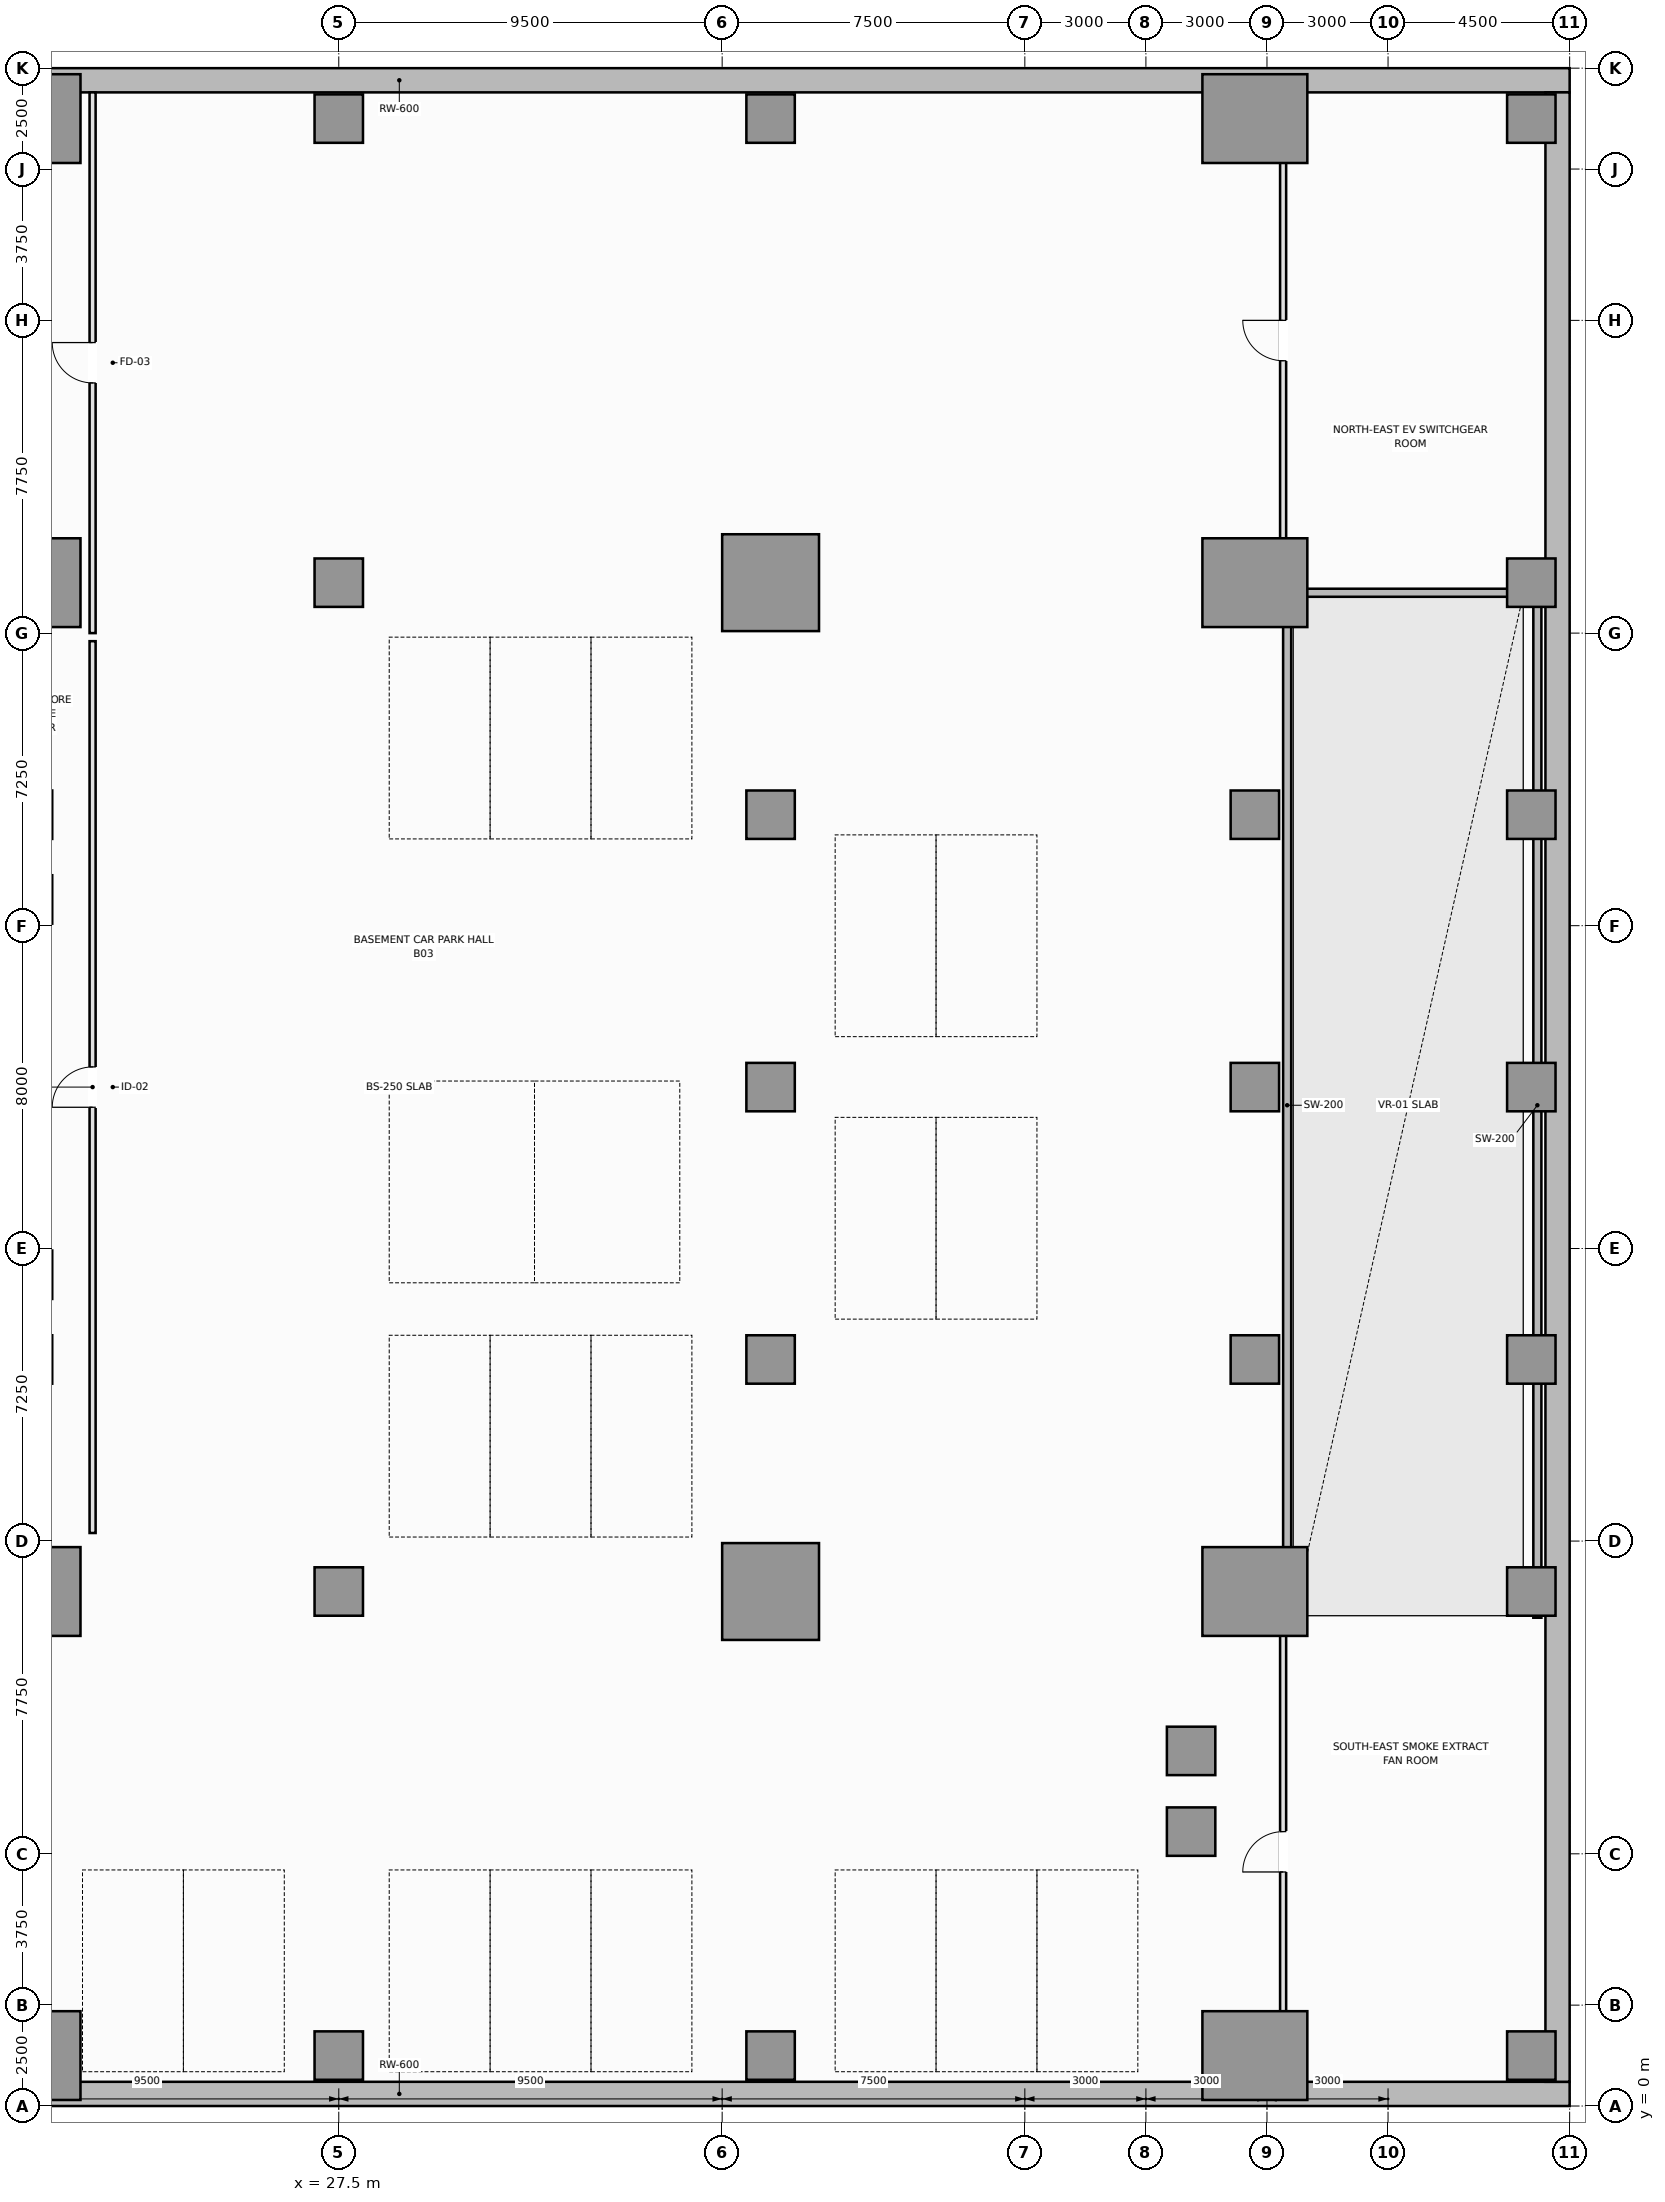
"""IFC4 building model, lengths in metres.
Left out: names, types, materials, properties, quantities, classifications, styles, units other than length and angle.
Written with IfcOpenShell. Run it as: python <this file> out.ifc"""

import sys

from ifc_helpers import new_model, si_unit, direction, frame, frame_2d, origin, origin_2d, place, context, subcontext, project, spatial, rectangle, extrude, element, fill, save


model = new_model("IFC4")
c1 = context("Model", 3, precision=1e-05, world=origin(), true_north=direction((0.0, 1.0)))
c2 = subcontext(c1, "Body", "Model", "MODEL_VIEW")
j1 = project(units=[si_unit("LENGTHUNIT", "METRE"), si_unit("PLANEANGLEUNIT", "RADIAN")], contexts=[c1])
p1 = place(None, origin())
s1 = spatial("IfcSite", under=j1, at=p1, CompositionType="ELEMENT")
p2 = place(p1, origin())
s2 = spatial("IfcBuilding", under=s1, at=p2, CompositionType="ELEMENT")
p3 = place(p2, frame((0.0, 0.0, -13.2)))
s3 = spatial("IfcBuildingStorey", under=s2, at=p3, CompositionType="ELEMENT", Elevation=-13.2)
for number, where, z_axis, x_axis in (
    (1, (0.0, 0.3, 0.0), (0.0, 0.0, 1.0), (1.0, 0.0, 0.0)),
    (2, (0.0, 50.2, 0.0), (0.0, 0.0, 1.0), (1.0, 0.0, 0.0)),
):
    element("IfcWall", number, at=place(p3, frame(where, z_axis=z_axis, x_axis=x_axis)), inside=s3, PredefinedType="USERDEFINED", context=c2, shape_type="SweptSolid", body=[
        extrude(rectangle(XDim=58.0, YDim=0.6, at=frame_2d((29.0, 0.0))), origin(), (0.0, 0.0, 1.0), 4.2),
    ])
p4 = place(p3, frame((57.7, 0.6, 0.0), z_axis=(0.0, 0.0, 1.0), x_axis=(0.0, 1.0, 0.0)))
e3 = element("IfcWall", 3, at=p4, inside=s3, PredefinedType="USERDEFINED", context=c2, shape_type="SweptSolid", body=[
    extrude(rectangle(XDim=49.3, YDim=0.6, at=frame_2d((24.65, 0.0))), origin(), (0.0, 0.0, 1.0), 4.2),
])
for number, where, z_axis, x_axis in (
    (4, (38.2, 12.75, 0.0), (0.0, 0.0, 1.0), (1.0, 0.0, 0.0)),
    (5, (38.2, 37.75, 0.0), (0.0, 0.0, 1.0), (1.0, 0.0, 0.0)),
):
    element("IfcColumn", number, at=place(p3, frame(where, z_axis=z_axis, x_axis=x_axis)), inside=s3, PredefinedType="COLUMN", context=c2, shape_type="SweptSolid", body=[
        extrude(rectangle(XDim=2.4, YDim=2.4, at=origin_2d()), origin(), (0.0, 0.0, 1.0), 4.2),
    ])
for number, where, z_axis, x_axis in (
    (6, (27.5, 12.75, 0.0), (0.0, 0.0, 1.0), (1.0, 0.0, 0.0)),
    (7, (27.5, 37.75, 0.0), (0.0, 0.0, 1.0), (1.0, 0.0, 0.0)),
    (8, (38.2, 18.5, 0.0), (0.0, 0.0, 1.0), (1.0, 0.0, 0.0)),
    (9, (38.2, 25.25, 0.0), (0.0, 0.0, 1.0), (1.0, 0.0, 0.0)),
    (10, (38.2, 32.0, 0.0), (0.0, 0.0, 1.0), (1.0, 0.0, 0.0)),
):
    element("IfcColumn", number, at=place(p3, frame(where, z_axis=z_axis, x_axis=x_axis)), inside=s3, PredefinedType="COLUMN", context=c2, shape_type="SweptSolid", body=[
        extrude(rectangle(XDim=1.2, YDim=1.2, at=origin_2d()), origin(), (0.0, 0.0, 1.0), 4.2),
    ])
for number, where, z_axis, x_axis in (
    (11, (19.8, 1.25, 0.0), (0.0, 0.0, 1.0), (1.0, 0.0, 0.0)),
    (12, (50.2, 1.25, 0.0), (0.0, 0.0, 1.0), (1.0, 0.0, 0.0)),
    (13, (19.8, 12.75, 0.0), (0.0, 0.0, 1.0), (1.0, 0.0, 0.0)),
    (14, (50.2, 12.75, 0.0), (0.0, 0.0, 1.0), (1.0, 0.0, 0.0)),
    (15, (19.8, 37.75, 0.0), (0.0, 0.0, 1.0), (1.0, 0.0, 0.0)),
    (16, (50.2, 37.75, 0.0), (0.0, 0.0, 1.0), (1.0, 0.0, 0.0)),
    (17, (19.8, 49.25, 0.0), (0.0, 0.0, 1.0), (1.0, 0.0, 0.0)),
    (18, (50.2, 49.25, 0.0), (0.0, 0.0, 1.0), (1.0, 0.0, 0.0)),
):
    element("IfcColumn", number, at=place(p3, frame(where, z_axis=z_axis, x_axis=x_axis)), inside=s3, PredefinedType="COLUMN", context=c2, shape_type="SweptSolid", body=[
        extrude(rectangle(XDim=2.6, YDim=2.2, at=origin_2d()), origin(), (0.0, 0.0, 1.0), 4.2),
    ])
for number, where, z_axis, x_axis in (
    (19, (19.8, 18.5, 0.0), (0.0, 0.0, 1.0), (1.0, 0.0, 0.0)),
    (20, (19.8, 20.6, 0.0), (0.0, 0.0, 1.0), (1.0, 0.0, 0.0)),
    (21, (19.8, 29.9, 0.0), (0.0, 0.0, 1.0), (1.0, 0.0, 0.0)),
    (22, (19.8, 32.0, 0.0), (0.0, 0.0, 1.0), (1.0, 0.0, 0.0)),
    (23, (50.2, 18.5, 0.0), (0.0, 0.0, 1.0), (1.0, 0.0, 0.0)),
    (24, (50.2, 25.25, 0.0), (0.0, 0.0, 1.0), (1.0, 0.0, 0.0)),
    (25, (50.2, 32.0, 0.0), (0.0, 0.0, 1.0), (1.0, 0.0, 0.0)),
    (26, (57.05, 1.25, 0.0), (0.0, 0.0, 1.0), (1.0, 0.0, 0.0)),
    (27, (57.05, 12.75, 0.0), (0.0, 0.0, 1.0), (1.0, 0.0, 0.0)),
    (28, (57.05, 18.5, 0.0), (0.0, 0.0, 1.0), (1.0, 0.0, 0.0)),
    (29, (57.05, 25.25, 0.0), (0.0, 0.0, 1.0), (1.0, 0.0, 0.0)),
    (30, (57.05, 32.0, 0.0), (0.0, 0.0, 1.0), (1.0, 0.0, 0.0)),
    (31, (57.05, 37.75, 0.0), (0.0, 0.0, 1.0), (1.0, 0.0, 0.0)),
    (32, (57.05, 49.25, 0.0), (0.0, 0.0, 1.0), (1.0, 0.0, 0.0)),
    (33, (48.62, 6.8, 0.0), (0.0, 0.0, 1.0), (1.0, 0.0, 0.0)),
    (34, (48.62, 8.8, 0.0), (0.0, 0.0, 1.0), (1.0, 0.0, 0.0)),
    (35, (27.5, 1.25, 0.0), (0.0, 0.0, 1.0), (1.0, 0.0, 0.0)),
    (36, (38.2, 1.25, 0.0), (0.0, 0.0, 1.0), (1.0, 0.0, 0.0)),
    (37, (27.5, 49.25, 0.0), (0.0, 0.0, 1.0), (1.0, 0.0, 0.0)),
    (38, (38.2, 49.25, 0.0), (0.0, 0.0, 1.0), (1.0, 0.0, 0.0)),
):
    element("IfcColumn", number, at=place(p3, frame(where, z_axis=z_axis, x_axis=x_axis)), inside=s3, PredefinedType="COLUMN", context=c2, shape_type="SweptSolid", body=[
        extrude(rectangle(XDim=1.2, YDim=1.2, at=origin_2d()), origin(), (0.0, 0.0, 1.0), 4.2),
    ])
for number, where, z_axis, x_axis in (
    (39, (51.0, 12.1, 0.0), (0.0, 0.0, 1.0), (0.0, 1.0, 0.0)),
    (40, (57.2, 12.1, 0.0), (0.0, 0.0, 1.0), (0.0, 1.0, 0.0)),
):
    element("IfcWall", number, at=place(p3, frame(where, z_axis=z_axis, x_axis=x_axis)), inside=s3, PredefinedType="SOLIDWALL", context=c2, shape_type="SweptSolid", body=[
        extrude(rectangle(XDim=25.4, YDim=0.2, at=frame_2d((12.7, 0.0))), origin(), (0.0, 0.0, 1.0), 4.2),
    ])
p5 = place(p3, frame((51.0, 37.5, 0.0), z_axis=(0.0, 0.0, 1.0), x_axis=(1.0, 0.0, 0.0)))
e41 = element("IfcWall", 41, at=p5, inside=s3, PredefinedType="SOLIDWALL", context=c2, shape_type="SweptSolid", body=[
    extrude(rectangle(XDim=6.2, YDim=0.2, at=frame_2d((3.1, 0.0))), origin(), (0.0, 0.0, 1.0), 4.2),
])
p6 = place(p3, frame((21.4, 14.2, 0.0), z_axis=(0.0, 0.0, 1.0), x_axis=(0.0, 1.0, 0.0)))
e42 = element("IfcWall", 42, at=p6, inside=s3, PredefinedType="PARTITIONING", context=c2, shape_type="SweptSolid", body=[
    extrude(rectangle(XDim=22.1, YDim=0.15, at=frame_2d((11.05, 0.0))), origin(), (0.0, 0.0, 1.0), 4.0),
])
p7 = place(p6, frame((10.55, 0.0, 0.0)))
e43 = element("IfcOpeningElement", 43, at=p7, cuts=e42, PredefinedType="OPENING", context=c2, shape_type="SweptSolid", body=[
    extrude(rectangle(XDim=1.0, YDim=2.15, at=frame_2d((0.5, 1.075))), frame((0.0, 0.085, 0.0), z_axis=(0.0, -1.0, 0.0), x_axis=(1.0, 0.0, 0.0)), (0.0, 0.0, 1.0), 0.17),
])
p8 = place(p3, frame((21.4, 36.5, 0.0), z_axis=(0.0, 0.0, 1.0), x_axis=(0.0, 1.0, 0.0)))
e44 = element("IfcWall", 44, at=p8, inside=s3, PredefinedType="PARTITIONING", context=c2, shape_type="SweptSolid", body=[
    extrude(rectangle(XDim=13.4, YDim=0.15, at=frame_2d((6.7, 0.0))), origin(), (0.0, 0.0, 1.0), 4.0),
])
p9 = place(p8, frame((6.2, 0.0, 0.0)))
e45 = element("IfcOpeningElement", 45, at=p9, cuts=e44, PredefinedType="OPENING", context=c2, shape_type="SweptSolid", body=[
    extrude(rectangle(XDim=1.0, YDim=2.15, at=frame_2d((0.5, 1.075))), frame((0.0, 0.085, 0.0), z_axis=(0.0, -1.0, 0.0), x_axis=(1.0, 0.0, 0.0)), (0.0, 0.0, 1.0), 0.17),
])
p10 = place(p3, frame((50.9, 0.6, 0.0), z_axis=(0.0, 0.0, 1.0), x_axis=(0.0, 1.0, 0.0)))
e46 = element("IfcWall", 46, at=p10, inside=s3, PredefinedType="PARTITIONING", context=c2, shape_type="SweptSolid", body=[
    extrude(rectangle(XDim=11.4, YDim=0.15, at=frame_2d((5.7, 0.0))), origin(), (0.0, 0.0, 1.0), 4.0),
])
p11 = place(p10, frame((5.2, 0.0, 0.0)))
e47 = element("IfcOpeningElement", 47, at=p11, cuts=e46, PredefinedType="OPENING", context=c2, shape_type="SweptSolid", body=[
    extrude(rectangle(XDim=1.0, YDim=2.15, at=frame_2d((0.5, 1.075))), frame((0.0, 0.085, 0.0), z_axis=(0.0, -1.0, 0.0), x_axis=(1.0, 0.0, 0.0)), (0.0, 0.0, 1.0), 0.17),
])
p12 = place(p3, frame((50.9, 37.6, 0.0), z_axis=(0.0, 0.0, 1.0), x_axis=(0.0, 1.0, 0.0)))
e48 = element("IfcWall", 48, at=p12, inside=s3, PredefinedType="PARTITIONING", context=c2, shape_type="SweptSolid", body=[
    extrude(rectangle(XDim=12.3, YDim=0.15, at=frame_2d((6.15, 0.0))), origin(), (0.0, 0.0, 1.0), 4.0),
])
p13 = place(p12, frame((5.65, 0.0, 0.0)))
e49 = element("IfcOpeningElement", 49, at=p13, cuts=e48, PredefinedType="OPENING", context=c2, shape_type="SweptSolid", body=[
    extrude(rectangle(XDim=1.0, YDim=2.15, at=frame_2d((0.5, 1.075))), frame((0.0, 0.085, 0.0), z_axis=(0.0, -1.0, 0.0), x_axis=(1.0, 0.0, 0.0)), (0.0, 0.0, 1.0), 0.17),
])
p14 = place(p7, origin())
e50 = element("IfcDoor", 50, at=p14, inside=s3, OperationType="SINGLE_SWING_LEFT", PredefinedType="DOOR", context=c2, shape_type="SweptSolid", body=[
    extrude(rectangle(XDim=1.0, YDim=2.15, at=frame_2d((0.5, 1.075))), frame((0.0, 0.025, 0.0), z_axis=(0.0, -1.0, 0.0), x_axis=(1.0, 0.0, 0.0)), (0.0, 0.0, 1.0), 0.05),
])
fill(e43, e50)
p15 = place(p9, origin())
e51 = element("IfcDoor", 51, at=p15, inside=s3, OperationType="SINGLE_SWING_RIGHT", PredefinedType="DOOR", context=c2, shape_type="SweptSolid", body=[
    extrude(rectangle(XDim=1.0, YDim=2.15, at=frame_2d((0.5, 1.075))), frame((0.0, 0.025, 0.0), z_axis=(0.0, -1.0, 0.0), x_axis=(1.0, 0.0, 0.0)), (0.0, 0.0, 1.0), 0.05),
])
fill(e45, e51)
p16 = place(p11, origin())
e52 = element("IfcDoor", 52, at=p16, inside=s3, OperationType="SINGLE_SWING_LEFT", PredefinedType="DOOR", context=c2, shape_type="SweptSolid", body=[
    extrude(rectangle(XDim=1.0, YDim=2.15, at=frame_2d((0.5, 1.075))), frame((0.0, 0.025, 0.0), z_axis=(0.0, -1.0, 0.0), x_axis=(1.0, 0.0, 0.0)), (0.0, 0.0, 1.0), 0.05),
])
fill(e47, e52)
p17 = place(p13, origin())
e53 = element("IfcDoor", 53, at=p17, inside=s3, OperationType="SINGLE_SWING_RIGHT", PredefinedType="DOOR", context=c2, shape_type="SweptSolid", body=[
    extrude(rectangle(XDim=1.0, YDim=2.15, at=frame_2d((0.5, 1.075))), frame((0.0, 0.025, 0.0), z_axis=(0.0, -1.0, 0.0), x_axis=(1.0, 0.0, 0.0)), (0.0, 0.0, 1.0), 0.05),
])
fill(e49, e53)
save(model, sys.argv[1])
